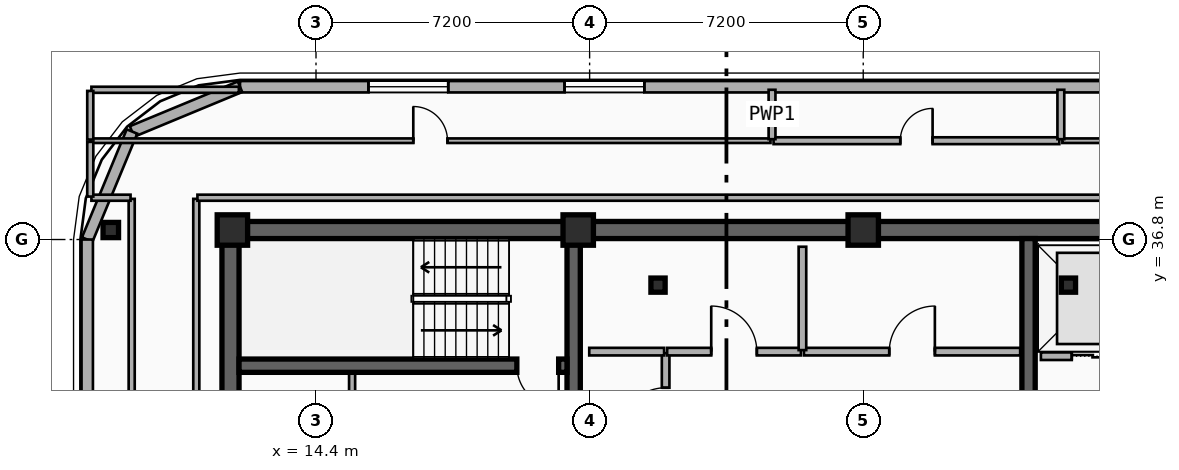
"""IFC4 building model, lengths in metres.
Left out: names, types, materials, properties, quantities, classifications, styles, units other than length and angle.
Written with IfcOpenShell. Run it as: python <this file> out.ifc"""

import sys

from ifc_helpers import new_model, si_unit, direction, frame, frame_2d, origin, origin_2d, place, context, subcontext, project, spatial, rectangle, i_section, extrude, element, fill, save


model = new_model("IFC4")
c1 = context("Model", 3, precision=1e-05, world=origin(), true_north=direction((0.0, 1.0)))
c2 = subcontext(c1, "Body", "Model", "MODEL_VIEW")
j1 = project(units=[si_unit("LENGTHUNIT", "METRE"), si_unit("PLANEANGLEUNIT", "RADIAN")], contexts=[c1])
p1 = place(None, origin())
s1 = spatial("IfcSite", under=j1, at=p1, CompositionType="ELEMENT")
p2 = place(p1, origin())
s2 = spatial("IfcBuilding", under=s1, at=p2, CompositionType="ELEMENT")
p3 = place(p2, frame((0.0, 0.0, 273.2)))
s3 = spatial("IfcBuildingStorey", under=s2, at=p3, CompositionType="ELEMENT", Elevation=273.2)
p4 = place(p3, frame((12.15, 37.05, 0.0), z_axis=(0.0, 0.0, 1.0), x_axis=(1.0, 0.0, 0.0)))
e1 = element("IfcWall", 1, at=p4, inside=s3, PredefinedType="SHEAR", context=c2, shape_type="SweptSolid", body=[
    extrude(rectangle(XDim=33.23, YDim=0.45, at=frame_2d((16.615, 0.0))), origin(), (0.0, 0.0, 1.0), 3.7),
])
p5 = place(p3, frame((12.15, 28.045, 0.0), z_axis=(0.0, 0.0, 1.0), x_axis=(0.0, 1.0, 0.0)))
e2 = element("IfcWall", 2, at=p5, inside=s3, PredefinedType="SHEAR", context=c2, shape_type="SweptSolid", body=[
    extrude(rectangle(XDim=8.78, YDim=0.45, at=frame_2d((4.39, 0.0))), origin(), (0.0, 0.0, 1.0), 3.7),
])
for number, where, z_axis, x_axis in (
    (3, (21.18, 28.045, 0.0), (0.0, 0.0, 1.0), (0.0, 1.0, 0.0)),
    (4, (33.15, 28.045, 0.0), (0.0, 0.0, 1.0), (0.0, 1.0, 0.0)),
):
    element("IfcWall", number, at=place(p3, frame(where, z_axis=z_axis, x_axis=x_axis)), inside=s3, PredefinedType="SHEAR", context=c2, shape_type="SweptSolid", body=[
        extrude(rectangle(XDim=8.78, YDim=0.35, at=frame_2d((4.39, 0.0))), origin(), (0.0, 0.0, 1.0), 3.7),
    ])
p6 = place(p3, frame((21.005, 33.48, 0.0), z_axis=(0.0, 0.0, 1.0), x_axis=(-1.0, 0.0, 0.0)))
e5 = element("IfcWall", 5, at=p6, inside=s3, PredefinedType="SHEAR", context=c2, shape_type="SweptSolid", body=[
    extrude(rectangle(XDim=8.63, YDim=0.35, at=frame_2d((4.315, 0.0))), origin(), (0.0, 0.0, 1.0), 3.7),
])
p7 = place(p6, frame((0.22, 0.0, 0.0)))
e6 = element("IfcOpeningElement", 6, at=p7, cuts=e5, PredefinedType="OPENING", context=c2, shape_type="SweptSolid", body=[
    extrude(rectangle(XDim=1.1, YDim=2.15, at=frame_2d((0.55, 1.075))), frame((0.0, 0.185, 0.0), z_axis=(0.0, -1.0, 0.0), x_axis=(1.0, 0.0, 0.0)), (0.0, 0.0, 1.0), 0.37),
])
for number, where, z_axis, x_axis in (
    (7, (34.2, 35.6, 0.0), (0.0, 0.0, 1.0), (1.0, 0.0, 0.0)),
    (8, (23.4, 35.6, 0.0), (0.0, 0.0, 1.0), (1.0, 0.0, 0.0)),
):
    element("IfcColumn", number, at=place(p3, frame(where, z_axis=z_axis, x_axis=x_axis)), inside=s3, PredefinedType="COLUMN", context=c2, shape_type="SweptSolid", body=[
        extrude(i_section(OverallWidth=0.374, OverallDepth=0.372, WebThickness=0.017, FlangeThickness=0.027, FilletRadius=0.015, at=origin_2d()), origin(), (0.0, 0.0, 1.0), 3.7),
    ])
for number, where, z_axis, x_axis in (
    (9, (12.2, 37.05, 0.0), (0.0, 0.0, 1.0), (1.0, 0.0, 0.0)),
    (10, (21.3, 37.05, 0.0), (0.0, 0.0, 1.0), (1.0, 0.0, 0.0)),
    (11, (28.8, 37.05, 0.0), (0.0, 0.0, 1.0), (1.0, 0.0, 0.0)),
):
    element("IfcColumn", number, at=place(p3, frame(where, z_axis=z_axis, x_axis=x_axis)), inside=s3, PredefinedType="COLUMN", context=c2, shape_type="SweptSolid", body=[
        extrude(rectangle(XDim=0.8, YDim=0.8, at=origin_2d()), origin(), (0.0, 0.0, 1.0), 3.7),
    ])
p8 = place(p3, frame((9.0, 37.05, 0.0), z_axis=(0.0, 0.0, 1.0), x_axis=(1.0, 0.0, 0.0)))
e12 = element("IfcColumn", 12, at=p8, inside=s3, PredefinedType="COLUMN", context=c2, shape_type="SweptSolid", body=[
    extrude(i_section(OverallWidth=0.408, OverallDepth=0.4, WebThickness=0.025, FlangeThickness=0.039, FilletRadius=0.015, at=origin_2d()), origin(), (0.0, 0.0, 1.0), 3.7),
])
p9 = place(p3, frame((12.4, 40.82, 0.0), z_axis=(0.0, 0.0, 1.0), x_axis=(1.0, 0.0, 0.0)))
e13 = element("IfcWall", 13, at=p9, inside=s3, PredefinedType="SOLIDWALL", context=c2, shape_type="SweptSolid", body=[
    extrude(rectangle(XDim=32.8, YDim=0.3, at=frame_2d((16.4, 0.0))), origin(), (0.0, 0.0, 1.0), 3.42),
])
p10 = place(p9, frame((3.38, 0.0, 0.75)))
e14 = element("IfcOpeningElement", 14, at=p10, cuts=e13, PredefinedType="OPENING", context=c2, shape_type="SweptSolid", body=[
    extrude(rectangle(XDim=2.1, YDim=2.1, at=frame_2d((1.05, 1.05))), frame((0.0, 0.16, 0.0), z_axis=(0.0, -1.0, 0.0), x_axis=(1.0, 0.0, 0.0)), (0.0, 0.0, 1.0), 0.32),
])
p11 = place(p9, frame((8.54, 0.0, 0.75)))
e15 = element("IfcOpeningElement", 15, at=p11, cuts=e13, PredefinedType="OPENING", context=c2, shape_type="SweptSolid", body=[
    extrude(rectangle(XDim=2.1, YDim=2.1, at=frame_2d((1.05, 1.05))), frame((0.0, 0.16, 0.0), z_axis=(0.0, -1.0, 0.0), x_axis=(1.0, 0.0, 0.0)), (0.0, 0.0, 1.0), 0.32),
])
for number, where, z_axis, x_axis in (
    (16, (9.557, 39.643, 0.0), (0.0, 0.0, 1.0), (0.924, 0.383, 0.0)),
    (17, (8.38, 36.8, 0.0), (0.0, 0.0, 1.0), (0.383, 0.924, 0.0)),
):
    element("IfcWall", number, at=place(p3, frame(where, z_axis=z_axis, x_axis=x_axis)), inside=s3, PredefinedType="SOLIDWALL", context=c2, shape_type="SweptSolid", body=[
        extrude(rectangle(XDim=3.077, YDim=0.3, at=frame_2d((1.538, 0.0))), origin(), (0.0, 0.0, 1.0), 3.42),
    ])
p12 = place(p3, frame((8.38, 2.6, 0.0), z_axis=(0.0, 0.0, 1.0), x_axis=(0.0, 1.0, 0.0)))
e18 = element("IfcWall", 18, at=p12, inside=s3, PredefinedType="SOLIDWALL", context=c2, shape_type="SweptSolid", body=[
    extrude(rectangle(XDim=34.2, YDim=0.3, at=frame_2d((17.1, 0.0))), origin(), (0.0, 0.0, 1.0), 3.42),
])
p13 = place(p12, frame((6.33, 0.0, 0.75)))
e19 = element("IfcOpeningElement", 19, at=p13, cuts=e18, PredefinedType="OPENING", context=c2, shape_type="SweptSolid", body=[
    extrude(rectangle(XDim=2.1, YDim=2.1, at=frame_2d((1.05, 1.05))), frame((0.0, 0.16, 0.0), z_axis=(0.0, -1.0, 0.0), x_axis=(1.0, 0.0, 0.0)), (0.0, 0.0, 1.0), 0.32),
])
p14 = place(p12, frame((14.44, 0.0, 0.75)))
e20 = element("IfcOpeningElement", 20, at=p14, cuts=e18, PredefinedType="OPENING", context=c2, shape_type="SweptSolid", body=[
    extrude(rectangle(XDim=2.1, YDim=2.1, at=frame_2d((1.05, 1.05))), frame((0.0, 0.16, 0.0), z_axis=(0.0, -1.0, 0.0), x_axis=(1.0, 0.0, 0.0)), (0.0, 0.0, 1.0), 0.32),
])
p15 = place(p3, frame((33.475, 33.73, 0.0), z_axis=(0.0, 0.0, 1.0), x_axis=(1.0, 0.0, 0.0)))
e21 = element("IfcWall", 21, at=p15, inside=s3, PredefinedType="PARTITIONING", context=c2, shape_type="SweptSolid", body=[
    extrude(rectangle(XDim=2.725, YDim=0.2, at=frame_2d((1.362, 0.0))), origin(), (0.0, 0.0, 1.0), 2.49),
])
p16 = place(p15, frame((0.812, 0.0, 0.0)))
e22 = element("IfcOpeningElement", 22, at=p16, cuts=e21, PredefinedType="OPENING", context=c2, shape_type="SweptSolid", body=[
    extrude(rectangle(XDim=1.1, YDim=2.15, at=frame_2d((0.55, 1.075))), frame((0.0, 0.11, 0.0), z_axis=(0.0, -1.0, 0.0), x_axis=(1.0, 0.0, 0.0)), (0.0, 0.0, 1.0), 0.22),
])
p17 = place(p3, frame((23.6, 30.79, 0.0), z_axis=(0.0, 0.0, 1.0), x_axis=(0.0, 1.0, 0.0)))
e23 = element("IfcWall", 23, at=p17, inside=s3, PredefinedType="PARTITIONING", context=c2, shape_type="SweptSolid", body=[
    extrude(rectangle(XDim=3.02, YDim=0.2, at=frame_2d((1.51, 0.0))), origin(), (0.0, 0.0, 1.0), 3.42),
])
p18 = place(p17, frame((0.91, 0.0, 0.0)))
e24 = element("IfcOpeningElement", 24, at=p18, cuts=e23, PredefinedType="OPENING", context=c2, shape_type="SweptSolid", body=[
    extrude(rectangle(XDim=1.2, YDim=2.15, at=frame_2d((0.6, 1.075))), frame((0.0, 0.11, 0.0), z_axis=(0.0, -1.0, 0.0), x_axis=(1.0, 0.0, 0.0)), (0.0, 0.0, 1.0), 0.22),
])
p19 = place(p3, frame((23.64, 33.85, 0.0), z_axis=(0.0, 0.0, 1.0), x_axis=(1.0, 0.0, 0.0)))
e25 = element("IfcWall", 25, at=p19, inside=s3, PredefinedType="PARTITIONING", context=c2, shape_type="SweptSolid", body=[
    extrude(rectangle(XDim=3.52, YDim=0.2, at=frame_2d((1.76, 0.0))), origin(), (0.0, 0.0, 1.0), 3.42),
])
p20 = place(p19, frame((1.16, 0.0, 0.0)))
e26 = element("IfcOpeningElement", 26, at=p20, cuts=e25, PredefinedType="OPENING", context=c2, shape_type="SweptSolid", body=[
    extrude(rectangle(XDim=1.2, YDim=2.15, at=frame_2d((0.6, 1.075))), frame((0.0, 0.11, 0.0), z_axis=(0.0, -1.0, 0.0), x_axis=(1.0, 0.0, 0.0)), (0.0, 0.0, 1.0), 0.22),
])
p21 = place(p3, frame((27.24, 33.85, 0.0), z_axis=(0.0, 0.0, 1.0), x_axis=(1.0, 0.0, 0.0)))
e27 = element("IfcWall", 27, at=p21, inside=s3, PredefinedType="PARTITIONING", context=c2, shape_type="SweptSolid", body=[
    extrude(rectangle(XDim=5.69, YDim=0.2, at=frame_2d((2.845, 0.0))), origin(), (0.0, 0.0, 1.0), 2.49),
])
p22 = place(p21, frame((2.245, 0.0, 0.0)))
e28 = element("IfcOpeningElement", 28, at=p22, cuts=e27, PredefinedType="OPENING", context=c2, shape_type="SweptSolid", body=[
    extrude(rectangle(XDim=1.2, YDim=2.15, at=frame_2d((0.6, 1.075))), frame((0.0, 0.11, 0.0), z_axis=(0.0, -1.0, 0.0), x_axis=(1.0, 0.0, 0.0)), (0.0, 0.0, 1.0), 0.22),
])
p23 = place(p3, frame((21.59, 33.85, 0.0), z_axis=(0.0, 0.0, 1.0), x_axis=(1.0, 0.0, 0.0)))
e29 = element("IfcWall", 29, at=p23, inside=s3, PredefinedType="PARTITIONING", context=c2, shape_type="SweptSolid", body=[
    extrude(rectangle(XDim=1.97, YDim=0.2, at=frame_2d((0.985, 0.0))), origin(), (0.0, 0.0, 1.0), 2.49),
])
p24 = place(p3, frame((27.2, 33.89, 0.0), z_axis=(0.0, 0.0, 1.0), x_axis=(0.0, 1.0, 0.0)))
e30 = element("IfcWall", 30, at=p24, inside=s3, PredefinedType="PARTITIONING", context=c2, shape_type="SweptSolid", body=[
    extrude(rectangle(XDim=2.72, YDim=0.2, at=frame_2d((1.36, 0.0))), origin(), (0.0, 0.0, 1.0), 3.42),
])
p25 = place(p3, frame((8.46, 39.4, 0.0), z_axis=(0.0, 0.0, 1.0), x_axis=(1.0, 0.0, 0.0)))
e31 = element("IfcWall", 31, at=p25, inside=s3, PredefinedType="PARTITIONING", context=c2, shape_type="SweptSolid", body=[
    extrude(rectangle(XDim=17.9, YDim=0.12, at=frame_2d((8.95, 0.0))), origin(), (0.0, 0.0, 1.0), 3.42),
])
p26 = place(p25, frame((8.5, 0.0, 0.0)))
e32 = element("IfcOpeningElement", 32, at=p26, cuts=e31, PredefinedType="OPENING", context=c2, shape_type="SweptSolid", body=[
    extrude(rectangle(XDim=0.9, YDim=2.1, at=frame_2d((0.45, 1.05))), frame((0.0, 0.07, 0.0), z_axis=(0.0, -1.0, 0.0), x_axis=(1.0, 0.0, 0.0)), (0.0, 0.0, 1.0), 0.14),
])
p27 = place(p3, frame((26.44, 39.4, 0.0), z_axis=(0.0, 0.0, 1.0), x_axis=(1.0, 0.0, 0.0)))
e33 = element("IfcWall", 33, at=p27, inside=s3, PredefinedType="PLUMBINGWALL", context=c2, shape_type="SweptSolid", body=[
    extrude(rectangle(XDim=7.52, YDim=0.18, at=frame_2d((3.76, 0.0))), origin(), (0.0, 0.0, 1.0), 3.42),
])
p28 = place(p27, frame((3.335, 0.0, 0.0)))
e34 = element("IfcOpeningElement", 34, at=p28, cuts=e33, PredefinedType="OPENING", context=c2, shape_type="SweptSolid", body=[
    extrude(rectangle(XDim=0.85, YDim=2.1, at=frame_2d((0.425, 1.05))), frame((0.0, 0.1, 0.0), z_axis=(0.0, -1.0, 0.0), x_axis=(1.0, 0.0, 0.0)), (0.0, 0.0, 1.0), 0.2),
])
p29 = place(p3, frame((34.04, 39.4, 0.0), z_axis=(0.0, 0.0, 1.0), x_axis=(1.0, 0.0, 0.0)))
e35 = element("IfcWall", 35, at=p29, inside=s3, PredefinedType="PARTITIONING", context=c2, shape_type="SweptSolid", body=[
    extrude(rectangle(XDim=15.1, YDim=0.12, at=frame_2d((7.55, 0.0))), origin(), (0.0, 0.0, 1.0), 3.42),
])
p30 = place(p29, frame((7.1, 0.0, 0.0)))
e36 = element("IfcOpeningElement", 36, at=p30, cuts=e35, PredefinedType="OPENING", context=c2, shape_type="SweptSolid", body=[
    extrude(rectangle(XDim=0.9, YDim=2.1, at=frame_2d((0.45, 1.05))), frame((0.0, 0.07, 0.0), z_axis=(0.0, -1.0, 0.0), x_axis=(1.0, 0.0, 0.0)), (0.0, 0.0, 1.0), 0.14),
])
for number, where, z_axis, x_axis in (
    (37, (26.4, 39.44, 0.0), (0.0, 0.0, 1.0), (0.0, 1.0, 0.0)),
    (38, (34.0, 39.44, 0.0), (0.0, 0.0, 1.0), (0.0, 1.0, 0.0)),
):
    element("IfcWall", number, at=place(p3, frame(where, z_axis=z_axis, x_axis=x_axis)), inside=s3, PredefinedType="PLUMBINGWALL", context=c2, shape_type="SweptSolid", body=[
        extrude(rectangle(XDim=1.3, YDim=0.18, at=frame_2d((0.65, 0.0))), origin(), (0.0, 0.0, 1.0), 3.42),
    ])
p31 = place(p3, frame((15.35, 30.96, 0.0), z_axis=(0.0, 0.0, 1.0), x_axis=(0.0, 1.0, 0.0)))
e39 = element("IfcWall", 39, at=p31, inside=s3, PredefinedType="PARTITIONING", context=c2, shape_type="SweptSolid", body=[
    extrude(rectangle(XDim=2.31, YDim=0.16, at=frame_2d((1.155, 0.0))), origin(), (0.0, 0.0, 1.0), 3.42),
])
for number, where, z_axis, x_axis in (
    (40, (9.55, 27.63, 0.0), (0.0, 0.0, 1.0), (0.0, 1.0, 0.0)),
    (41, (11.25, 27.63, 0.0), (0.0, 0.0, 1.0), (0.0, 1.0, 0.0)),
):
    element("IfcWall", number, at=place(p3, frame(where, z_axis=z_axis, x_axis=x_axis)), inside=s3, PredefinedType="PARTITIONING", context=c2, shape_type="SweptSolid", body=[
        extrude(rectangle(XDim=10.24, YDim=0.16, at=frame_2d((5.12, 0.0))), origin(), (0.0, 0.0, 1.0), 2.9),
    ])
p32 = place(p3, frame((8.49, 37.9, 0.0), z_axis=(0.0, 0.0, 1.0), x_axis=(1.0, 0.0, 0.0)))
e42 = element("IfcWall", 42, at=p32, inside=s3, PredefinedType="PARTITIONING", context=c2, shape_type="SweptSolid", body=[
    extrude(rectangle(XDim=1.03, YDim=0.16, at=frame_2d((0.515, 0.0))), origin(), (0.0, 0.0, 1.0), 3.42),
])
p33 = place(p3, frame((11.28, 37.9, 0.0), z_axis=(0.0, 0.0, 1.0), x_axis=(1.0, 0.0, 0.0)))
e43 = element("IfcWall", 43, at=p33, inside=s3, PredefinedType="PARTITIONING", context=c2, shape_type="SweptSolid", body=[
    extrude(rectangle(XDim=35.04, YDim=0.16, at=frame_2d((17.52, 0.0))), origin(), (0.0, 0.0, 1.0), 3.42),
])
p34 = place(p3, frame((8.46, 37.93, 0.0), z_axis=(0.0, 0.0, 1.0), x_axis=(0.0, 1.0, 0.0)))
e44 = element("IfcWall", 44, at=p34, inside=s3, PredefinedType="PARTITIONING", context=c2, shape_type="SweptSolid", body=[
    extrude(rectangle(XDim=1.44, YDim=0.16, at=frame_2d((0.72, 0.0))), origin(), (0.0, 0.0, 1.0), 3.42),
])
p35 = place(p3, frame((8.49, 40.74, 0.0), z_axis=(0.0, 0.0, 1.0), x_axis=(1.0, 0.0, 0.0)))
e45 = element("IfcWall", 45, at=p35, inside=s3, PredefinedType="PARTITIONING", context=c2, shape_type="SweptSolid", body=[
    extrude(rectangle(XDim=3.88, YDim=0.16, at=frame_2d((1.94, 0.0))), origin(), (0.0, 0.0, 1.0), 3.42),
])
p36 = place(p3, frame((8.46, 39.43, 0.0), z_axis=(0.0, 0.0, 1.0), x_axis=(0.0, 1.0, 0.0)))
e46 = element("IfcWall", 46, at=p36, inside=s3, PredefinedType="PARTITIONING", context=c2, shape_type="SweptSolid", body=[
    extrude(rectangle(XDim=1.28, YDim=0.16, at=frame_2d((0.64, 0.0))), origin(), (0.0, 0.0, 1.0), 3.42),
])
p37 = place(p10, origin())
e47 = element("IfcWindow", 47, at=p37, inside=s3, PartitioningType="SINGLE_PANEL", PredefinedType="WINDOW", context=c2, shape_type="SweptSolid", body=[
    extrude(rectangle(XDim=2.1, YDim=2.1, at=frame_2d((1.05, 1.05))), frame((0.0, 0.03, 0.0), z_axis=(0.0, -1.0, 0.0), x_axis=(1.0, 0.0, 0.0)), (0.0, 0.0, 1.0), 0.06),
])
fill(e14, e47)
p38 = place(p11, origin())
e48 = element("IfcWindow", 48, at=p38, inside=s3, PartitioningType="SINGLE_PANEL", PredefinedType="WINDOW", context=c2, shape_type="SweptSolid", body=[
    extrude(rectangle(XDim=2.1, YDim=2.1, at=frame_2d((1.05, 1.05))), frame((0.0, 0.03, 0.0), z_axis=(0.0, -1.0, 0.0), x_axis=(1.0, 0.0, 0.0)), (0.0, 0.0, 1.0), 0.06),
])
fill(e15, e48)
p39 = place(p16, origin())
e49 = element("IfcDoor", 49, at=p39, inside=s3, OperationType="DOUBLE_DOOR_SLIDING", PredefinedType="DOOR", context=c2, shape_type="SweptSolid", body=[
    extrude(rectangle(XDim=1.1, YDim=2.15, at=frame_2d((0.55, 1.075))), frame((0.0, 0.025, 0.0), z_axis=(0.0, -1.0, 0.0), x_axis=(1.0, 0.0, 0.0)), (0.0, 0.0, 1.0), 0.05),
])
fill(e22, e49)
p40 = place(p7, origin())
e50 = element("IfcDoor", 50, at=p40, inside=s3, OperationType="SINGLE_SWING_LEFT", PredefinedType="DOOR", context=c2, shape_type="SweptSolid", body=[
    extrude(rectangle(XDim=1.1, YDim=2.15, at=frame_2d((0.55, 1.075))), frame((0.0, 0.025, 0.0), z_axis=(0.0, -1.0, 0.0), x_axis=(1.0, 0.0, 0.0)), (0.0, 0.0, 1.0), 0.05),
])
fill(e6, e50)
p41 = place(p18, origin())
e51 = element("IfcDoor", 51, at=p41, inside=s3, OperationType="SINGLE_SWING_LEFT", PredefinedType="DOOR", context=c2, shape_type="SweptSolid", body=[
    extrude(rectangle(XDim=1.2, YDim=2.15, at=frame_2d((0.6, 1.075))), frame((0.0, 0.025, 0.0), z_axis=(0.0, -1.0, 0.0), x_axis=(1.0, 0.0, 0.0)), (0.0, 0.0, 1.0), 0.05),
])
fill(e24, e51)
p42 = place(p20, origin())
e52 = element("IfcDoor", 52, at=p42, inside=s3, OperationType="SINGLE_SWING_LEFT", PredefinedType="DOOR", context=c2, shape_type="SweptSolid", body=[
    extrude(rectangle(XDim=1.2, YDim=2.15, at=frame_2d((0.6, 1.075))), frame((0.0, 0.025, 0.0), z_axis=(0.0, -1.0, 0.0), x_axis=(1.0, 0.0, 0.0)), (0.0, 0.0, 1.0), 0.05),
])
fill(e26, e52)
p43 = place(p22, origin())
e53 = element("IfcDoor", 53, at=p43, inside=s3, OperationType="SINGLE_SWING_RIGHT", PredefinedType="DOOR", context=c2, shape_type="SweptSolid", body=[
    extrude(rectangle(XDim=1.2, YDim=2.15, at=frame_2d((0.6, 1.075))), frame((0.0, 0.025, 0.0), z_axis=(0.0, -1.0, 0.0), x_axis=(1.0, 0.0, 0.0)), (0.0, 0.0, 1.0), 0.05),
])
fill(e28, e53)
p44 = place(p26, origin())
e54 = element("IfcDoor", 54, at=p44, inside=s3, OperationType="SINGLE_SWING_LEFT", PredefinedType="DOOR", context=c2, shape_type="SweptSolid", body=[
    extrude(rectangle(XDim=0.9, YDim=2.1, at=frame_2d((0.45, 1.05))), frame((0.0, 0.025, 0.0), z_axis=(0.0, -1.0, 0.0), x_axis=(1.0, 0.0, 0.0)), (0.0, 0.0, 1.0), 0.05),
])
fill(e32, e54)
p45 = place(p28, origin())
e55 = element("IfcDoor", 55, at=p45, inside=s3, OperationType="SINGLE_SWING_RIGHT", PredefinedType="DOOR", context=c2, shape_type="SweptSolid", body=[
    extrude(rectangle(XDim=0.85, YDim=2.1, at=frame_2d((0.425, 1.05))), frame((0.0, 0.025, 0.0), z_axis=(0.0, -1.0, 0.0), x_axis=(1.0, 0.0, 0.0)), (0.0, 0.0, 1.0), 0.05),
])
fill(e34, e55)
save(model, sys.argv[1])
